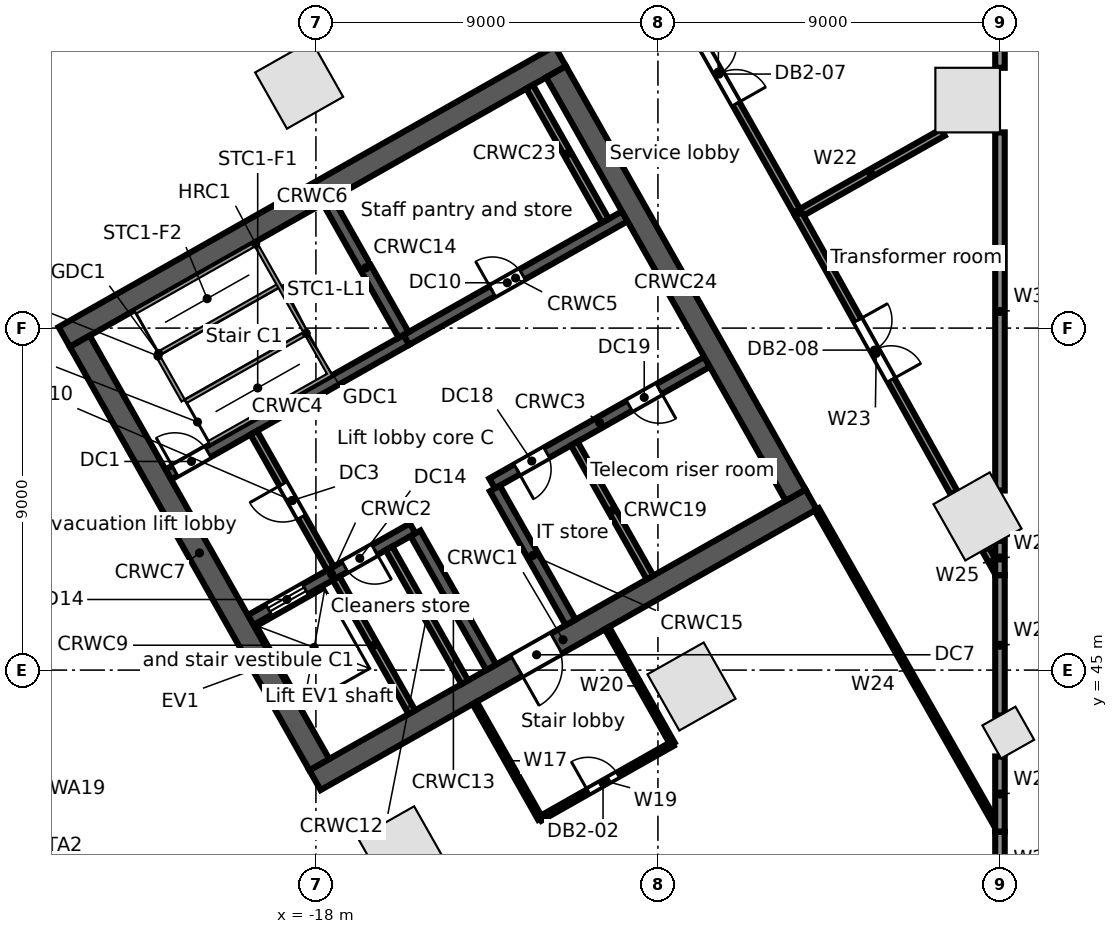
"""IFC4 building model, lengths in metres.
Left out: names, types, materials, properties, quantities, classifications, styles, units other than length and angle.
Written with IfcOpenShell. Run it as: python <this file> out.ifc"""

import sys

from ifc_helpers import new_model, si_unit, direction, frame, frame_2d, origin, origin_2d, place, context, subcontext, project, spatial, rectangle, extrude, element, fill, save


model = new_model("IFC4")
c1 = context("Model", 3, precision=1e-05, world=origin(), true_north=direction((0.0, 1.0)))
c2 = subcontext(c1, "Body", "Model", "MODEL_VIEW")
j1 = project(units=[si_unit("LENGTHUNIT", "METRE"), si_unit("PLANEANGLEUNIT", "RADIAN")], contexts=[c1])
p1 = place(None, origin())
s1 = spatial("IfcSite", under=j1, at=p1, CompositionType="ELEMENT")
p2 = place(p1, origin())
s2 = spatial("IfcBuilding", under=s1, at=p2, CompositionType="ELEMENT")
p3 = place(p2, frame((0.0, 0.0, -9.6)))
s3 = spatial("IfcBuildingStorey", under=s2, at=p3, CompositionType="ELEMENT", Elevation=-9.6)
p4 = place(p3, frame((-5.971, 78.503, -0.5), z_axis=(0.0, 0.0, 1.0), x_axis=(-0.870356741611, -0.492421711882, 0.0)))
e1 = element("IfcWall", 1, at=p4, inside=s3, PredefinedType="SOLIDWALL", context=c2, shape_type="SweptSolid", body=[
    extrude(rectangle(XDim=70.604, YDim=0.8, at=frame_2d((35.302, 0.0))), origin(), (0.0, 0.0, 1.0), 5.3),
])
for number, where, z_axis, x_axis in (
    (2, (-18.441, 60.406, -0.5), (0.0, 0.0, 1.0), (-0.87, -0.492, 0.0)),
    (3, (-15.736, 40.257, -0.5), (0.0, 0.0, 1.0), (0.87, 0.492, 0.0)),
    (4, (-8.117, 44.568, -0.5), (0.0, 0.0, 1.0), (0.87, 0.492, 0.0)),
    (5, (-0.591, 49.044, -0.5), (0.0, 0.0, 1.0), (0.87, 0.492, 0.0)),
    (6, (-0.85, 60.0, -0.5), (0.0, 0.0, 1.0), (0.0, 1.0, 0.0)),
):
    element("IfcColumn", number, at=place(p3, frame(where, z_axis=z_axis, x_axis=x_axis)), inside=s3, PredefinedType="COLUMN", context=c2, shape_type="SweptSolid", body=[
        extrude(rectangle(XDim=1.7, YDim=1.7, at=origin_2d()), origin(), (0.0, 0.0, 1.0), 5.3),
    ])
p5 = place(p3, frame((0.219, 43.355, -0.5), z_axis=(0.0, 0.0, 1.0), x_axis=(0.87035569594, 0.492423560103, 0.0)))
e7 = element("IfcColumn", 7, at=p5, inside=s3, PredefinedType="COLUMN", context=c2, shape_type="SweptSolid", body=[
    extrude(rectangle(XDim=1.0, YDim=1.0, at=origin_2d()), origin(), (0.0, 0.0, 1.0), 5.3),
])
p6 = place(p3, frame((-18.024, 42.104, 0.0), z_axis=(0.0, 0.0, 1.0), x_axis=(0.870360574057, 0.492414937962, 0.0)))
e8 = element("IfcWall", 8, at=p6, inside=s3, PredefinedType="SOLIDWALL", context=c2, shape_type="SweptSolid", body=[
    extrude(rectangle(XDim=15.0, YDim=0.6, at=frame_2d((7.5, 0.0))), origin(), (0.0, 0.0, 1.0), 4.4),
])
p7 = place(p6, frame((6.1, 0.0, 0.0)))
e9 = element("IfcOpeningElement", 9, at=p7, cuts=e8, PredefinedType="OPENING", context=c2, shape_type="SweptSolid", body=[
    extrude(rectangle(XDim=1.2, YDim=2.1, at=frame_2d((0.6, 1.05))), frame((0.0, 0.31, 0.0), z_axis=(0.0, -1.0, 0.0), x_axis=(1.0, 0.0, 0.0)), (0.0, 0.0, 1.0), 0.62),
])
p8 = place(p3, frame((-19.718, 46.316, 0.0), z_axis=(0.0, 0.0, 1.0), x_axis=(0.870353963862, 0.492426621528, 0.0)))
e10 = element("IfcWall", 10, at=p8, inside=s3, PredefinedType="SOLIDWALL", context=c2, shape_type="SweptSolid", body=[
    extrude(rectangle(XDim=4.9, YDim=0.3, at=frame_2d((2.45, 0.0))), origin(), (0.0, 0.0, 1.0), 4.4),
])
p9 = place(p8, frame((0.55, 0.0, 0.0)))
e11 = element("IfcOpeningElement", 11, at=p9, cuts=e10, PredefinedType="OPENING", context=c2, shape_type="SweptSolid", body=[
    extrude(rectangle(XDim=1.1, YDim=2.1, at=frame_2d((0.55, 1.05))), frame((0.0, 0.16, 0.0), z_axis=(0.0, -1.0, 0.0), x_axis=(1.0, 0.0, 0.0)), (0.0, 0.0, 1.0), 0.32),
])
p10 = place(p8, frame((2.85, 0.0, 0.0)))
e12 = element("IfcOpeningElement", 12, at=p10, cuts=e10, PredefinedType="OPENING", context=c2, shape_type="SweptSolid", body=[
    extrude(rectangle(XDim=0.9, YDim=2.1, at=frame_2d((0.45, 1.05))), frame((0.0, 0.16, 0.0), z_axis=(0.0, -1.0, 0.0), x_axis=(1.0, 0.0, 0.0)), (0.0, 0.0, 1.0), 0.32),
])
p11 = place(p3, frame((-13.365, 49.911, 0.0), z_axis=(0.0, 0.0, 1.0), x_axis=(0.870340995471, 0.49244954219, 0.0)))
e13 = element("IfcWall", 13, at=p11, inside=s3, PredefinedType="SOLIDWALL", context=c2, shape_type="SweptSolid", body=[
    extrude(rectangle(XDim=6.5, YDim=0.3, at=frame_2d((3.25, 0.0))), origin(), (0.0, 0.0, 1.0), 4.4),
])
p12 = place(p11, frame((0.75, 0.0, 0.0)))
e14 = element("IfcOpeningElement", 14, at=p12, cuts=e13, PredefinedType="OPENING", context=c2, shape_type="SweptSolid", body=[
    extrude(rectangle(XDim=0.9, YDim=2.1, at=frame_2d((0.45, 1.05))), frame((0.0, 0.16, 0.0), z_axis=(0.0, -1.0, 0.0), x_axis=(1.0, 0.0, 0.0)), (0.0, 0.0, 1.0), 0.32),
])
p13 = place(p11, frame((4.15, 0.0, 0.0)))
e15 = element("IfcOpeningElement", 15, at=p13, cuts=e13, PredefinedType="OPENING", context=c2, shape_type="SweptSolid", body=[
    extrude(rectangle(XDim=0.9, YDim=2.1, at=frame_2d((0.45, 1.05))), frame((0.0, 0.16, 0.0), z_axis=(0.0, -1.0, 0.0), x_axis=(1.0, 0.0, 0.0)), (0.0, 0.0, 1.0), 0.32),
])
p14 = place(p3, frame((-21.885, 50.146, 0.0), z_axis=(0.0, 0.0, 1.0), x_axis=(0.870359411463, 0.492416992881, 0.0)))
e16 = element("IfcWall", 16, at=p14, inside=s3, PredefinedType="SOLIDWALL", context=c2, shape_type="SweptSolid", body=[
    extrude(rectangle(XDim=7.2, YDim=0.3, at=frame_2d((3.6, 0.0))), origin(), (0.0, 0.0, 1.0), 4.4),
])
p15 = place(p14, frame((0.2, 0.0, 0.0)))
e17 = element("IfcOpeningElement", 17, at=p15, cuts=e16, PredefinedType="OPENING", context=c2, shape_type="SweptSolid", body=[
    extrude(rectangle(XDim=1.0, YDim=2.1, at=frame_2d((0.5, 1.05))), frame((0.0, 0.16, 0.0), z_axis=(0.0, -1.0, 0.0), x_axis=(1.0, 0.0, 0.0)), (0.0, 0.0, 1.0), 0.32),
])
p16 = place(p3, frame((-15.618, 53.691, 0.0), z_axis=(0.0, 0.0, 1.0), x_axis=(0.870356769198, 0.492421663121, 0.0)))
e18 = element("IfcWall", 18, at=p16, inside=s3, PredefinedType="SOLIDWALL", context=c2, shape_type="SweptSolid", body=[
    extrude(rectangle(XDim=6.6, YDim=0.3, at=frame_2d((3.3, 0.0))), origin(), (0.0, 0.0, 1.0), 4.4),
])
p17 = place(p16, frame((2.6, 0.0, 0.0)))
e19 = element("IfcOpeningElement", 19, at=p17, cuts=e18, PredefinedType="OPENING", context=c2, shape_type="SweptSolid", body=[
    extrude(rectangle(XDim=0.9, YDim=2.1, at=frame_2d((0.45, 1.05))), frame((0.0, 0.16, 0.0), z_axis=(0.0, -1.0, 0.0), x_axis=(1.0, 0.0, 0.0)), (0.0, 0.0, 1.0), 0.32),
])
p18 = place(p3, frame((-24.623, 53.767, 0.0), z_axis=(0.0, 0.0, 1.0), x_axis=(0.870356627484, 0.492421913601, 0.0)))
e20 = element("IfcWall", 20, at=p18, inside=s3, PredefinedType="SOLIDWALL", context=c2, shape_type="SweptSolid", body=[
    extrude(rectangle(XDim=15.0, YDim=0.6, at=frame_2d((7.5, 0.0))), origin(), (0.0, 0.0, 1.0), 4.4),
])
p19 = place(p3, frame((-24.214, 53.654, 0.0), z_axis=(0.0, 0.0, 1.0), x_axis=(0.492441221355, -0.870345703448, 0.0)))
e21 = element("IfcWall", 21, at=p19, inside=s3, PredefinedType="SOLIDWALL", context=c2, shape_type="SweptSolid", body=[
    extrude(rectangle(XDim=12.8, YDim=0.6, at=frame_2d((6.4, 0.0))), origin(), (0.0, 0.0, 1.0), 4.4),
])
p20 = place(p3, frame((-17.469, 47.417, 0.0), z_axis=(0.0, 0.0, 1.0), x_axis=(0.492440575896, -0.870346068648, 0.0)))
e22 = element("IfcWall", 22, at=p20, inside=s3, PredefinedType="SOLIDWALL", context=c2, shape_type="SweptSolid", body=[
    extrude(rectangle(XDim=4.05, YDim=0.2, at=frame_2d((2.025, 0.0))), origin(), (0.0, 0.0, 1.0), 4.4),
])
p21 = place(p3, frame((-19.635, 51.246, 0.0), z_axis=(0.0, 0.0, 1.0), x_axis=(0.492408451753, -0.87036424366, 0.0)))
e23 = element("IfcWall", 23, at=p21, inside=s3, PredefinedType="PARTITIONING", context=c2, shape_type="SweptSolid", body=[
    extrude(rectangle(XDim=4.1, YDim=0.2, at=frame_2d((2.05, 0.0))), origin(), (0.0, 0.0, 1.0), 4.4),
])
p22 = place(p21, frame((1.55, 0.0, 0.0)))
e24 = element("IfcOpeningElement", 24, at=p22, cuts=e23, PredefinedType="OPENING", context=c2, shape_type="SweptSolid", body=[
    extrude(rectangle(XDim=1.0, YDim=2.1, at=frame_2d((0.5, 1.05))), frame((0.0, 0.11, 0.0), z_axis=(0.0, -1.0, 0.0), x_axis=(1.0, 0.0, 0.0)), (0.0, 0.0, 1.0), 0.22),
])
p23 = place(p3, frame((-16.076, 48.205, 0.0), z_axis=(0.0, 0.0, 1.0), x_axis=(0.492394910396, -0.870371904542, 0.0)))
e25 = element("IfcWall", 25, at=p23, inside=s3, PredefinedType="SOLIDWALL", context=c2, shape_type="SweptSolid", body=[
    extrude(rectangle(XDim=4.05, YDim=0.2, at=frame_2d((2.025, 0.0))), origin(), (0.0, 0.0, 1.0), 4.4),
])
p24 = place(p3, frame((-15.379, 48.599, 0.0), z_axis=(0.0, 0.0, 1.0), x_axis=(0.492394910396, -0.870371904542, 0.0)))
e26 = element("IfcWall", 26, at=p24, inside=s3, PredefinedType="SOLIDWALL", context=c2, shape_type="SweptSolid", body=[
    extrude(rectangle(XDim=4.05, YDim=0.3, at=frame_2d((2.025, 0.0))), origin(), (0.0, 0.0, 1.0), 4.4),
])
p25 = place(p3, frame((-17.686, 57.347, 0.0), z_axis=(0.0, 0.0, 1.0), x_axis=(0.492420746998, -0.870357287513, 0.0)))
e27 = element("IfcWall", 27, at=p25, inside=s3, PredefinedType="SOLIDWALL", context=c2, shape_type="SweptSolid", body=[
    extrude(rectangle(XDim=4.05, YDim=0.3, at=frame_2d((2.025, 0.0))), origin(), (0.0, 0.0, 1.0), 4.4),
])
p26 = place(p3, frame((-13.291, 49.781, 0.0), z_axis=(0.0, 0.0, 1.0), x_axis=(0.492394910396, -0.870371904542, 0.0)))
e28 = element("IfcWall", 28, at=p26, inside=s3, PredefinedType="SOLIDWALL", context=c2, shape_type="SweptSolid", body=[
    extrude(rectangle(XDim=4.05, YDim=0.3, at=frame_2d((2.025, 0.0))), origin(), (0.0, 0.0, 1.0), 4.4),
])
p27 = place(p3, frame((-11.202, 50.962, 0.0), z_axis=(0.0, 0.0, 1.0), x_axis=(0.49241474071, -0.870360685654, 0.0)))
e29 = element("IfcWall", 29, at=p27, inside=s3, PredefinedType="PARTITIONING", context=c2, shape_type="SweptSolid", body=[
    extrude(rectangle(XDim=4.05, YDim=0.2, at=frame_2d((2.025, 0.0))), origin(), (0.0, 0.0, 1.0), 4.4),
])
p28 = place(p3, frame((-12.377, 60.351, 0.0), z_axis=(0.0, 0.0, 1.0), x_axis=(0.492440575896, -0.870346068648, 0.0)))
e30 = element("IfcWall", 30, at=p28, inside=s3, PredefinedType="SOLIDWALL", context=c2, shape_type="SweptSolid", body=[
    extrude(rectangle(XDim=4.05, YDim=0.2, at=frame_2d((2.025, 0.0))), origin(), (0.0, 0.0, 1.0), 4.4),
])
p29 = place(p3, frame((-11.681, 60.744, 0.0), z_axis=(0.0, 0.0, 1.0), x_axis=(0.492426772896, -0.870353878221, 0.0)))
e31 = element("IfcWall", 31, at=p29, inside=s3, PredefinedType="SOLIDWALL", context=c2, shape_type="SweptSolid", body=[
    extrude(rectangle(XDim=12.8, YDim=0.6, at=frame_2d((6.4, 0.0))), origin(), (0.0, 0.0, 1.0), 4.4),
])
p30 = place(p3, frame((-13.822, 44.137, 0.0), z_axis=(0.0, 0.0, 1.0), x_axis=(0.492604200384, -0.870253469837, 0.0)))
e32 = element("IfcWall", 32, at=p30, inside=s3, PredefinedType="PARTITIONING", context=c2, shape_type="SweptSolid", body=[
    extrude(rectangle(XDim=3.5, YDim=0.125, at=frame_2d((1.75, 0.0))), origin(), (0.0, 0.0, 1.0), 3.768),
])
p31 = place(p3, frame((-12.098, 41.091, 0.0), z_axis=(0.0, 0.0, 1.0), x_axis=(0.870297830159, 0.492525823506, 0.0)))
e33 = element("IfcWall", 33, at=p31, inside=s3, PredefinedType="PARTITIONING", context=c2, shape_type="SweptSolid", body=[
    extrude(rectangle(XDim=4.0, YDim=0.125, at=frame_2d((2.0, 0.0))), origin(), (0.0, 0.0, 1.0), 3.874),
])
p32 = place(p31, frame((1.45, 0.0, 0.0)))
e34 = element("IfcOpeningElement", 34, at=p32, cuts=e33, PredefinedType="OPENING", context=c2, shape_type="SweptSolid", body=[
    extrude(rectangle(XDim=0.9, YDim=2.1, at=frame_2d((0.45, 1.05))), frame((0.0, 0.073, 0.0), z_axis=(0.0, -1.0, 0.0), x_axis=(1.0, 0.0, 0.0)), (0.0, 0.0, 1.0), 0.145),
])
p33 = place(p3, frame((-10.34, 46.107, 0.0), z_axis=(0.0, 0.0, 1.0), x_axis=(0.492392845909, -0.87037307248, 0.0)))
e35 = element("IfcWall", 35, at=p33, inside=s3, PredefinedType="PARTITIONING", context=c2, shape_type="SweptSolid", body=[
    extrude(rectangle(XDim=3.5, YDim=0.125, at=frame_2d((1.75, 0.0))), origin(), (0.0, 0.0, 1.0), 3.768),
])
p34 = place(p3, frame((-9.532, 64.47, 0.0), z_axis=(0.0, 0.0, 1.0), x_axis=(0.492882680299, -0.870095778326, 0.0)))
e36 = element("IfcWall", 36, at=p34, inside=s3, PredefinedType="PARTITIONING", context=c2, shape_type="SweptSolid", body=[
    extrude(rectangle(XDim=8.584, YDim=0.2, at=frame_2d((4.292, 0.0))), origin(), (0.0, 0.0, 1.0), 3.462),
])
p35 = place(p34, frame((3.45, 0.0, 0.0)))
e37 = element("IfcOpeningElement", 37, at=p35, cuts=e36, PredefinedType="OPENING", context=c2, shape_type="SweptSolid", body=[
    extrude(rectangle(XDim=1.8, YDim=2.1, at=frame_2d((0.9, 1.05))), frame((0.0, 0.11, 0.0), z_axis=(0.0, -1.0, 0.0), x_axis=(1.0, 0.0, 0.0)), (0.0, 0.0, 1.0), 0.22),
])
p36 = place(p3, frame((-5.301, 57.001, 0.0), z_axis=(0.0, 0.0, 1.0), x_axis=(0.870403402545, 0.492339229433, 0.0)))
e38 = element("IfcWall", 38, at=p36, inside=s3, PredefinedType="PARTITIONING", context=c2, shape_type="SweptSolid", body=[
    extrude(rectangle(XDim=4.365, YDim=0.2, at=frame_2d((2.182, 0.0))), origin(), (0.0, 0.0, 1.0), 3.462),
])
p37 = place(p3, frame((-5.301, 57.001, 0.0), z_axis=(0.0, 0.0, 1.0), x_axis=(0.487215056149, -0.873282021492, 0.0)))
e39 = element("IfcWall", 39, at=p37, inside=s3, PredefinedType="PARTITIONING", context=c2, shape_type="SweptSolid", body=[
    extrude(rectangle(XDim=8.395, YDim=0.2, at=frame_2d((4.197, 0.0))), origin(), (0.0, 0.0, 1.0), 4.4),
])
p38 = place(p37, frame((3.2, 0.0, 0.0)))
e40 = element("IfcOpeningElement", 40, at=p38, cuts=e39, PredefinedType="OPENING", context=c2, shape_type="SweptSolid", body=[
    extrude(rectangle(XDim=1.8, YDim=2.1, at=frame_2d((0.9, 1.05))), frame((0.0, 0.11, 0.0), z_axis=(0.0, -1.0, 0.0), x_axis=(1.0, 0.0, 0.0)), (0.0, 0.0, 1.0), 0.22),
])
p39 = place(p3, frame((-4.821, 49.23, 0.0), z_axis=(0.0, 0.0, 1.0), x_axis=(0.494232133704, -0.869329970733, 0.0)))
e41 = element("IfcWall", 41, at=p39, inside=s3, PredefinedType="PARTITIONING", context=c2, shape_type="SweptSolid", body=[
    extrude(rectangle(XDim=9.755, YDim=0.125, at=frame_2d((4.877, 0.0))), origin(), (0.0, 0.0, 1.0), 3.768),
])
p40 = place(p3, frame((-0.383, 48.186, 0.0), z_axis=(0.0, 0.0, 1.0), x_axis=(0.487514911941, -0.873114660646, 0.0)))
e42 = element("IfcWall", 42, at=p40, inside=s3, PredefinedType="PARTITIONING", context=c2, shape_type="SweptSolid", body=[
    extrude(rectangle(XDim=0.786, YDim=0.2, at=frame_2d((0.393, 0.0))), origin(), (0.0, 0.0, 1.0), 3.462),
])
p41 = place(p3, frame((0.0, 38.579, 0.0), z_axis=(0.0, 0.0, 1.0), x_axis=(0.0, 1.0, 0.0)))
e43 = element("IfcWall", 43, at=p41, inside=s3, PredefinedType="PARTITIONING", context=c2, shape_type="SweptSolid", body=[
    extrude(rectangle(XDim=2.171, YDim=0.25, at=frame_2d((1.085, 0.0))), origin(), (0.0, 0.0, 1.0), 4.4),
])
p42 = place(p3, frame((0.0, 40.75, 0.0), z_axis=(0.0, 0.0, 1.0), x_axis=(0.0, 1.0, 0.0)))
e44 = element("IfcWall", 44, at=p42, inside=s3, PredefinedType="PARTITIONING", context=c2, shape_type="SweptSolid", body=[
    extrude(rectangle(XDim=1.977, YDim=0.25, at=frame_2d((0.989, 0.0))), origin(), (0.0, 0.0, 1.0), 4.4),
])
p43 = place(p3, frame((0.0, 43.806, 0.0), z_axis=(0.0, 0.0, 1.0), x_axis=(0.0, 1.0, 0.0)))
e45 = element("IfcWall", 45, at=p43, inside=s3, PredefinedType="PARTITIONING", context=c2, shape_type="SweptSolid", body=[
    extrude(rectangle(XDim=3.694, YDim=0.25, at=frame_2d((1.847, 0.0))), origin(), (0.0, 0.0, 1.0), 3.462),
])
p44 = place(p3, frame((0.0, 47.5, 0.0), z_axis=(0.0, 0.0, 1.0), x_axis=(0.0, 1.0, 0.0)))
e46 = element("IfcWall", 46, at=p44, inside=s3, PredefinedType="PARTITIONING", context=c2, shape_type="SweptSolid", body=[
    extrude(rectangle(XDim=0.902, YDim=0.25, at=frame_2d((0.451, 0.0))), origin(), (0.0, 0.0, 1.0), 4.4),
])
p45 = place(p3, frame((0.0, 49.726, 0.0), z_axis=(0.0, 0.0, 1.0), x_axis=(0.0, 1.0, 0.0)))
e47 = element("IfcWall", 47, at=p45, inside=s3, PredefinedType="PARTITIONING", context=c2, shape_type="SweptSolid", body=[
    extrude(rectangle(XDim=9.424, YDim=0.25, at=frame_2d((4.712, 0.0))), origin(), (0.0, 0.0, 1.0), 4.4),
])
p46 = place(p3, frame((0.0, 60.85, 0.0), z_axis=(0.0, 0.0, 1.0), x_axis=(0.0, 1.0, 0.0)))
e48 = element("IfcWall", 48, at=p46, inside=s3, PredefinedType="PARTITIONING", context=c2, shape_type="SweptSolid", body=[
    extrude(rectangle(XDim=7.723, YDim=0.25, at=frame_2d((3.861, 0.0))), origin(), (0.0, 0.0, 1.0), 3.68),
])
p47 = place(p9, origin())
e49 = element("IfcDoor", 49, at=p47, inside=s3, OperationType="DOUBLE_DOOR_SLIDING", PredefinedType="DOOR", context=c2, shape_type="SweptSolid", body=[
    extrude(rectangle(XDim=1.1, YDim=2.1, at=frame_2d((0.55, 1.05))), frame((0.0, 0.025, 0.0), z_axis=(0.0, -1.0, 0.0), x_axis=(1.0, 0.0, 0.0)), (0.0, 0.0, 1.0), 0.05),
])
fill(e11, e49)
p48 = place(p15, origin())
e50 = element("IfcDoor", 50, at=p48, inside=s3, OperationType="SINGLE_SWING_LEFT", PredefinedType="DOOR", context=c2, shape_type="SweptSolid", body=[
    extrude(rectangle(XDim=1.0, YDim=2.1, at=frame_2d((0.5, 1.05))), frame((0.0, 0.025, 0.0), z_axis=(0.0, -1.0, 0.0), x_axis=(1.0, 0.0, 0.0)), (0.0, 0.0, 1.0), 0.05),
])
fill(e17, e50)
p49 = place(p22, frame((1.0, 0.0, 0.0), z_axis=(0.0, 0.0, 1.0), x_axis=(-1.0, 0.0, 0.0)))
e51 = element("IfcDoor", 51, at=p49, inside=s3, OperationType="SINGLE_SWING_RIGHT", PredefinedType="DOOR", context=c2, shape_type="SweptSolid", body=[
    extrude(rectangle(XDim=1.0, YDim=2.1, at=frame_2d((0.5, 1.05))), frame((0.0, 0.025, 0.0), z_axis=(0.0, -1.0, 0.0), x_axis=(1.0, 0.0, 0.0)), (0.0, 0.0, 1.0), 0.05),
])
fill(e24, e51)
p50 = place(p7, frame((1.2, 0.0, 0.0), z_axis=(0.0, 0.0, 1.0), x_axis=(-1.0, 0.0, 0.0)))
e52 = element("IfcDoor", 52, at=p50, inside=s3, OperationType="SINGLE_SWING_RIGHT", PredefinedType="DOOR", context=c2, shape_type="SweptSolid", body=[
    extrude(rectangle(XDim=1.2, YDim=2.1, at=frame_2d((0.6, 1.05))), frame((0.0, 0.025, 0.0), z_axis=(0.0, -1.0, 0.0), x_axis=(1.0, 0.0, 0.0)), (0.0, 0.0, 1.0), 0.05),
])
fill(e9, e52)
p51 = place(p17, origin())
e53 = element("IfcDoor", 53, at=p51, inside=s3, OperationType="SINGLE_SWING_LEFT", PredefinedType="DOOR", context=c2, shape_type="SweptSolid", body=[
    extrude(rectangle(XDim=0.9, YDim=2.1, at=frame_2d((0.45, 1.05))), frame((0.0, 0.025, 0.0), z_axis=(0.0, -1.0, 0.0), x_axis=(1.0, 0.0, 0.0)), (0.0, 0.0, 1.0), 0.05),
])
fill(e19, e53)
p52 = place(p10, frame((0.9, 0.0, 0.0), z_axis=(0.0, 0.0, 1.0), x_axis=(-1.0, 0.0, 0.0)))
e54 = element("IfcDoor", 54, at=p52, inside=s3, OperationType="SINGLE_SWING_LEFT", PredefinedType="DOOR", context=c2, shape_type="SweptSolid", body=[
    extrude(rectangle(XDim=0.9, YDim=2.1, at=frame_2d((0.45, 1.05))), frame((0.0, 0.025, 0.0), z_axis=(0.0, -1.0, 0.0), x_axis=(1.0, 0.0, 0.0)), (0.0, 0.0, 1.0), 0.05),
])
fill(e12, e54)
p53 = place(p12, frame((0.9, 0.0, 0.0), z_axis=(0.0, 0.0, 1.0), x_axis=(-1.0, 0.0, 0.0)))
e55 = element("IfcDoor", 55, at=p53, inside=s3, OperationType="SINGLE_SWING_RIGHT", PredefinedType="DOOR", context=c2, shape_type="SweptSolid", body=[
    extrude(rectangle(XDim=0.9, YDim=2.1, at=frame_2d((0.45, 1.05))), frame((0.0, 0.025, 0.0), z_axis=(0.0, -1.0, 0.0), x_axis=(1.0, 0.0, 0.0)), (0.0, 0.0, 1.0), 0.05),
])
fill(e14, e55)
p54 = place(p13, frame((0.9, 0.0, 0.0), z_axis=(0.0, 0.0, 1.0), x_axis=(-1.0, 0.0, 0.0)))
e56 = element("IfcDoor", 56, at=p54, inside=s3, OperationType="SINGLE_SWING_LEFT", PredefinedType="DOOR", context=c2, shape_type="SweptSolid", body=[
    extrude(rectangle(XDim=0.9, YDim=2.1, at=frame_2d((0.45, 1.05))), frame((0.0, 0.025, 0.0), z_axis=(0.0, -1.0, 0.0), x_axis=(1.0, 0.0, 0.0)), (0.0, 0.0, 1.0), 0.05),
])
fill(e15, e56)
p55 = place(p32, origin())
e57 = element("IfcDoor", 57, at=p55, inside=s3, OperationType="SINGLE_SWING_LEFT", PredefinedType="DOOR", context=c2, shape_type="SweptSolid", body=[
    extrude(rectangle(XDim=0.9, YDim=2.1, at=frame_2d((0.45, 1.05))), frame((0.0, 0.025, 0.0), z_axis=(0.0, -1.0, 0.0), x_axis=(1.0, 0.0, 0.0)), (0.0, 0.0, 1.0), 0.05),
])
fill(e34, e57)
p56 = place(p35, origin())
e58 = element("IfcDoor", 58, at=p56, inside=s3, OperationType="DOUBLE_DOOR_SINGLE_SWING", PredefinedType="DOOR", context=c2, shape_type="SweptSolid", body=[
    extrude(rectangle(XDim=1.8, YDim=2.1, at=frame_2d((0.9, 1.05))), frame((0.0, 0.025, 0.0), z_axis=(0.0, -1.0, 0.0), x_axis=(1.0, 0.0, 0.0)), (0.0, 0.0, 1.0), 0.05),
])
fill(e37, e58)
p57 = place(p38, origin())
e59 = element("IfcDoor", 59, at=p57, inside=s3, OperationType="DOUBLE_DOOR_SINGLE_SWING", PredefinedType="DOOR", context=c2, shape_type="SweptSolid", body=[
    extrude(rectangle(XDim=1.8, YDim=2.1, at=frame_2d((0.9, 1.05))), frame((0.0, 0.025, 0.0), z_axis=(0.0, -1.0, 0.0), x_axis=(1.0, 0.0, 0.0)), (0.0, 0.0, 1.0), 0.05),
])
fill(e40, e59)
save(model, sys.argv[1])
